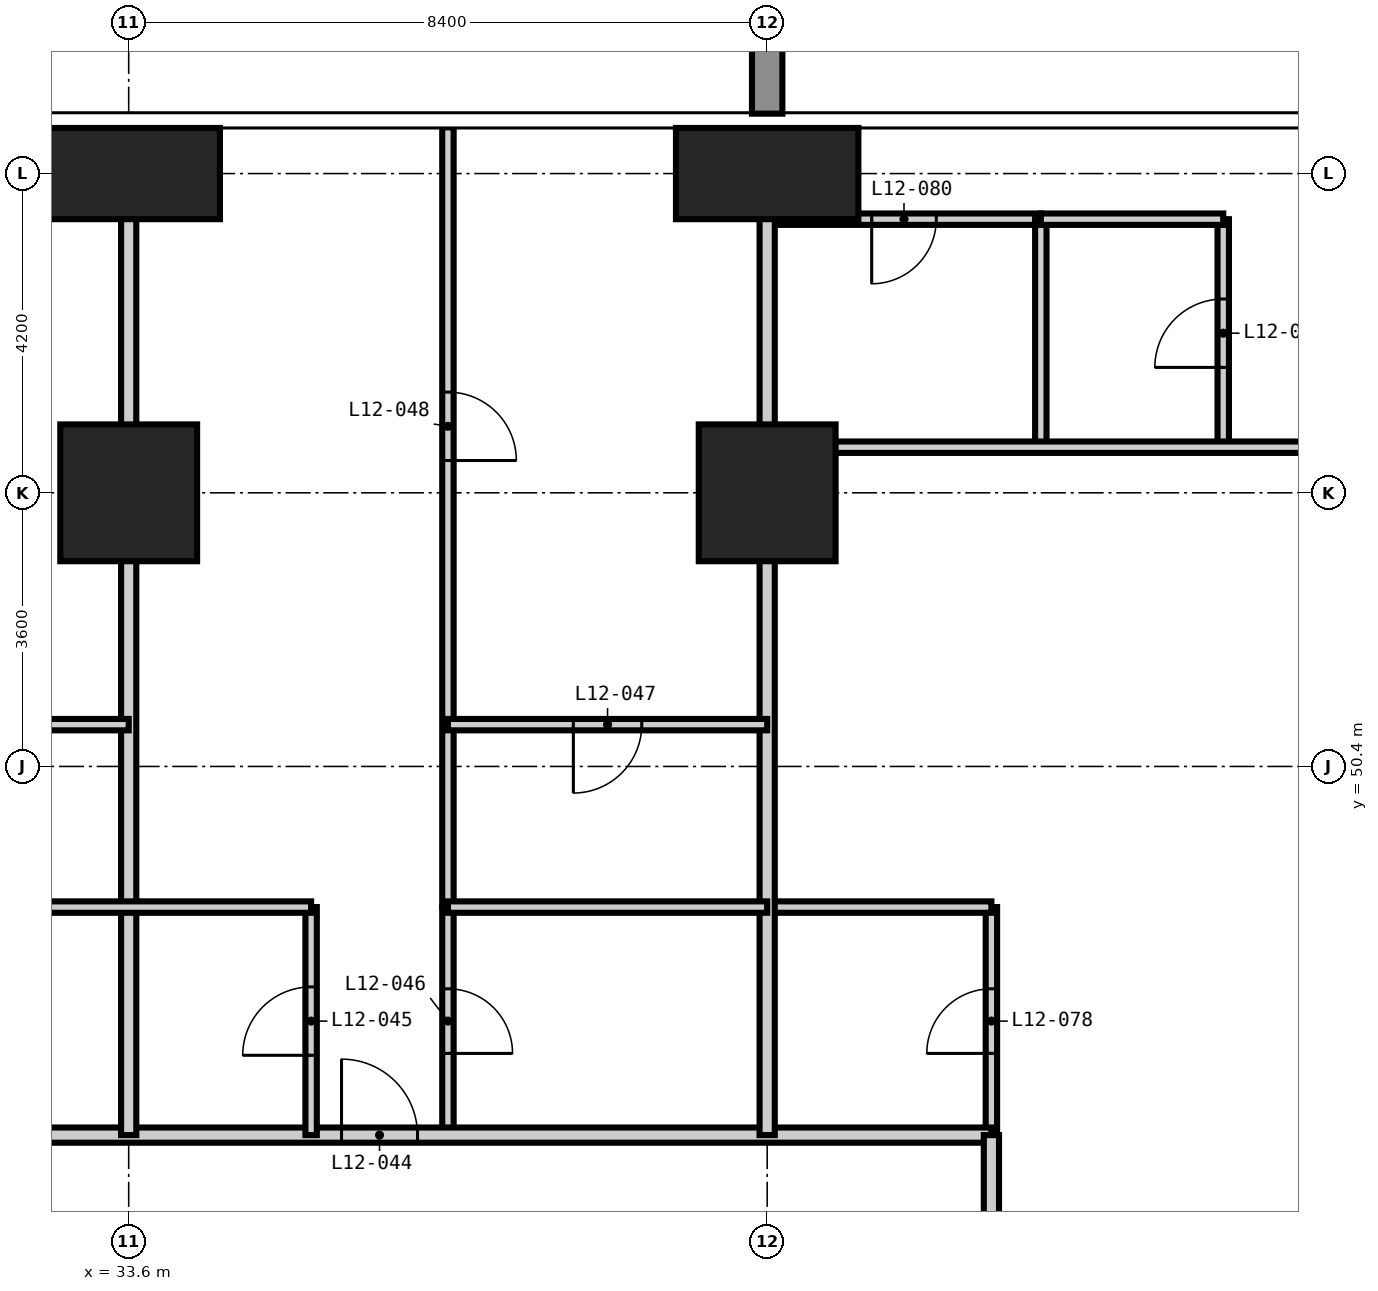
"""IFC4 building model, lengths in metres.
Left out: names, types, materials, properties, quantities, classifications, styles, units other than length and angle.
Written with IfcOpenShell. Run it as: python <this file> out.ifc"""

import sys

from ifc_helpers import new_model, si_unit, direction, frame, frame_2d, origin, origin_2d, place, context, subcontext, project, spatial, rectangle, extrude, element, fill, save


model = new_model("IFC4")
c1 = context("Model", 3, precision=1e-05, world=origin(), true_north=direction((0.0, 1.0)))
c2 = subcontext(c1, "Body", "Model", "MODEL_VIEW")
j1 = project(units=[si_unit("LENGTHUNIT", "METRE"), si_unit("PLANEANGLEUNIT", "RADIAN")], contexts=[c1])
p1 = place(None, origin())
s1 = spatial("IfcSite", under=j1, at=p1, CompositionType="ELEMENT")
p2 = place(p1, origin())
s2 = spatial("IfcBuilding", under=s1, at=p2, CompositionType="ELEMENT")
p3 = place(p2, frame((0.0, 0.0, 52.2)))
s3 = spatial("IfcBuildingStorey", under=s2, at=p3, CompositionType="ELEMENT", Elevation=52.2)
p4 = place(p3, frame((33.6, 54.0, -0.35), z_axis=(0.0, 0.0, 1.0), x_axis=(1.0, 0.0, 0.0)))
e1 = element("IfcColumn", 1, at=p4, inside=s3, PredefinedType="COLUMN", context=c2, shape_type="SweptSolid", body=[
    extrude(rectangle(XDim=1.8, YDim=1.8, at=origin_2d()), origin(), (0.0, 0.0, 1.0), 3.6),
])
p5 = place(p3, frame((33.6, 58.2, -0.35), z_axis=(0.0, 0.0, 1.0), x_axis=(1.0, 0.0, 0.0)))
e2 = element("IfcColumn", 2, at=p5, inside=s3, PredefinedType="COLUMN", context=c2, shape_type="SweptSolid", body=[
    extrude(rectangle(XDim=2.4, YDim=1.2, at=origin_2d()), origin(), (0.0, 0.0, 1.0), 3.6),
])
p6 = place(p3, frame((42.0, 54.0, -0.35), z_axis=(0.0, 0.0, 1.0), x_axis=(1.0, 0.0, 0.0)))
e3 = element("IfcColumn", 3, at=p6, inside=s3, PredefinedType="COLUMN", context=c2, shape_type="SweptSolid", body=[
    extrude(rectangle(XDim=1.8, YDim=1.8, at=origin_2d()), origin(), (0.0, 0.0, 1.0), 3.6),
])
p7 = place(p3, frame((42.0, 58.2, -0.35), z_axis=(0.0, 0.0, 1.0), x_axis=(1.0, 0.0, 0.0)))
e4 = element("IfcColumn", 4, at=p7, inside=s3, PredefinedType="COLUMN", context=c2, shape_type="SweptSolid", body=[
    extrude(rectangle(XDim=2.4, YDim=1.2, at=origin_2d()), origin(), (0.0, 0.0, 1.0), 3.6),
])
p8 = place(p3, frame((37.8, 45.55, 0.0), z_axis=(0.0, 0.0, 1.0), x_axis=(0.0, 1.0, 0.0)))
e5 = element("IfcWall", 5, at=p8, inside=s3, PredefinedType="PARTITIONING", context=c2, shape_type="SweptSolid", body=[
    extrude(rectangle(XDim=3.0, YDim=0.15, at=frame_2d((1.5, 0.0))), origin(), (0.0, 0.0, 1.0), 3.25),
])
p9 = place(p8, frame((1.075, 0.0, 0.0)))
e6 = element("IfcOpeningElement", 6, at=p9, cuts=e5, PredefinedType="OPENING", context=c2, shape_type="SweptSolid", body=[
    extrude(rectangle(XDim=0.85, YDim=2.1, at=frame_2d((0.425, 1.05))), frame((0.0, 0.085, 0.0), z_axis=(0.0, -1.0, 0.0), x_axis=(1.0, 0.0, 0.0)), (0.0, 0.0, 1.0), 0.17),
])
p10 = place(p3, frame((44.95, 45.55, 0.0), z_axis=(0.0, 0.0, 1.0), x_axis=(0.0, 1.0, 0.0)))
e7 = element("IfcWall", 7, at=p10, inside=s3, PredefinedType="PARTITIONING", context=c2, shape_type="SweptSolid", body=[
    extrude(rectangle(XDim=3.0, YDim=0.15, at=frame_2d((1.5, 0.0))), origin(), (0.0, 0.0, 1.0), 3.25),
])
p11 = place(p10, frame((1.075, 0.0, 0.0)))
e8 = element("IfcOpeningElement", 8, at=p11, cuts=e7, PredefinedType="OPENING", context=c2, shape_type="SweptSolid", body=[
    extrude(rectangle(XDim=0.85, YDim=2.1, at=frame_2d((0.425, 1.05))), frame((0.0, 0.085, 0.0), z_axis=(0.0, -1.0, 0.0), x_axis=(1.0, 0.0, 0.0)), (0.0, 0.0, 1.0), 0.17),
])
p12 = place(p3, frame((42.0, 48.55, 0.0), z_axis=(0.0, 0.0, 1.0), x_axis=(1.0, 0.0, 0.0)))
e9 = element("IfcWall", 9, at=p12, inside=s3, PredefinedType="PARTITIONING", context=c2, shape_type="SweptSolid", body=[
    extrude(rectangle(XDim=2.95, YDim=0.15, at=frame_2d((1.475, 0.0))), origin(), (0.0, 0.0, 1.0), 3.25),
])
p13 = place(p3, frame((42.0, 57.6, 0.0), z_axis=(0.0, 0.0, 1.0), x_axis=(1.0, 0.0, 0.0)))
e10 = element("IfcWall", 10, at=p13, inside=s3, PredefinedType="PARTITIONING", context=c2, shape_type="SweptSolid", body=[
    extrude(rectangle(XDim=3.6, YDim=0.15, at=frame_2d((1.8, 0.0))), origin(), (0.0, 0.0, 1.0), 3.25),
])
p14 = place(p13, frame((1.375, 0.0, 0.0)))
e11 = element("IfcOpeningElement", 11, at=p14, cuts=e10, PredefinedType="OPENING", context=c2, shape_type="SweptSolid", body=[
    extrude(rectangle(XDim=0.85, YDim=2.1, at=frame_2d((0.425, 1.05))), frame((0.0, 0.085, 0.0), z_axis=(0.0, -1.0, 0.0), x_axis=(1.0, 0.0, 0.0)), (0.0, 0.0, 1.0), 0.17),
])
p15 = place(p3, frame((12.65, 45.55, 0.0), z_axis=(0.0, 0.0, 1.0), x_axis=(1.0, 0.0, 0.0)))
e12 = element("IfcWall", 12, at=p15, inside=s3, PredefinedType="PARTITIONING", context=c2, shape_type="SweptSolid", body=[
    extrude(rectangle(XDim=32.3, YDim=0.2, at=frame_2d((16.15, 0.0))), origin(), (0.0, 0.0, 1.0), 3.25),
])
p16 = place(p15, frame((6.95, 0.0, 0.0)))
e13 = element("IfcOpeningElement", 13, at=p16, cuts=e12, PredefinedType="OPENING", context=c2, shape_type="SweptSolid", body=[
    extrude(rectangle(XDim=1.0, YDim=2.2, at=frame_2d((0.5, 1.1))), frame((0.0, 0.11, 0.0), z_axis=(0.0, -1.0, 0.0), x_axis=(1.0, 0.0, 0.0)), (0.0, 0.0, 1.0), 0.22),
])
p17 = place(p15, frame((15.35, 0.0, 0.0)))
e14 = element("IfcOpeningElement", 14, at=p17, cuts=e12, PredefinedType="OPENING", context=c2, shape_type="SweptSolid", body=[
    extrude(rectangle(XDim=1.0, YDim=2.2, at=frame_2d((0.5, 1.1))), frame((0.0, 0.11, 0.0), z_axis=(0.0, -1.0, 0.0), x_axis=(1.0, 0.0, 0.0)), (0.0, 0.0, 1.0), 0.22),
])
p18 = place(p15, frame((23.75, 0.0, 0.0)))
e15 = element("IfcOpeningElement", 15, at=p18, cuts=e12, PredefinedType="OPENING", context=c2, shape_type="SweptSolid", body=[
    extrude(rectangle(XDim=1.0, YDim=2.2, at=frame_2d((0.5, 1.1))), frame((0.0, 0.11, 0.0), z_axis=(0.0, -1.0, 0.0), x_axis=(1.0, 0.0, 0.0)), (0.0, 0.0, 1.0), 0.22),
])
p19 = place(p3, frame((44.95, 45.55, 0.0), z_axis=(0.0, 0.0, 1.0), x_axis=(0.0, -1.0, 0.0)))
e16 = element("IfcWall", 16, at=p19, inside=s3, PredefinedType="PARTITIONING", context=c2, shape_type="SweptSolid", body=[
    extrude(rectangle(XDim=32.9, YDim=0.2, at=frame_2d((16.45, 0.0))), origin(), (0.0, 0.0, 1.0), 3.25),
])
p20 = place(p19, frame((24.8, 0.0, 0.0)))
e17 = element("IfcOpeningElement", 17, at=p20, cuts=e16, PredefinedType="OPENING", context=c2, shape_type="SweptSolid", body=[
    extrude(rectangle(XDim=1.0, YDim=2.2, at=frame_2d((0.5, 1.1))), frame((0.0, 0.11, 0.0), z_axis=(0.0, -1.0, 0.0), x_axis=(1.0, 0.0, 0.0)), (0.0, 0.0, 1.0), 0.22),
])
p21 = place(p19, frame((19.85, 0.0, 0.0)))
e18 = element("IfcOpeningElement", 18, at=p21, cuts=e16, PredefinedType="OPENING", context=c2, shape_type="SweptSolid", body=[
    extrude(rectangle(XDim=1.0, YDim=2.2, at=frame_2d((0.5, 1.1))), frame((0.0, 0.11, 0.0), z_axis=(0.0, -1.0, 0.0), x_axis=(1.0, 0.0, 0.0)), (0.0, 0.0, 1.0), 0.22),
])
p22 = place(p19, frame((11.45, 0.0, 0.0)))
e19 = element("IfcOpeningElement", 19, at=p22, cuts=e16, PredefinedType="OPENING", context=c2, shape_type="SweptSolid", body=[
    extrude(rectangle(XDim=1.0, YDim=2.2, at=frame_2d((0.5, 1.1))), frame((0.0, 0.11, 0.0), z_axis=(0.0, -1.0, 0.0), x_axis=(1.0, 0.0, 0.0)), (0.0, 0.0, 1.0), 0.22),
])
p23 = place(p19, frame((6.5, 0.0, 0.0)))
e20 = element("IfcOpeningElement", 20, at=p23, cuts=e16, PredefinedType="OPENING", context=c2, shape_type="SweptSolid", body=[
    extrude(rectangle(XDim=1.0, YDim=2.2, at=frame_2d((0.5, 1.1))), frame((0.0, 0.11, 0.0), z_axis=(0.0, -1.0, 0.0), x_axis=(1.0, 0.0, 0.0)), (0.0, 0.0, 1.0), 0.22),
])
p24 = place(p19, frame((30.325, 0.0, 0.0)))
e21 = element("IfcOpeningElement", 21, at=p24, cuts=e16, PredefinedType="OPENING", context=c2, shape_type="SweptSolid", body=[
    extrude(rectangle(XDim=1.0, YDim=2.2, at=frame_2d((0.5, 1.1))), frame((0.0, 0.11, 0.0), z_axis=(0.0, -1.0, 0.0), x_axis=(1.0, 0.0, 0.0)), (0.0, 0.0, 1.0), 0.22),
])
p25 = place(p19, frame((1.275, 0.0, 0.0)))
e22 = element("IfcOpeningElement", 22, at=p25, cuts=e16, PredefinedType="OPENING", context=c2, shape_type="SweptSolid", body=[
    extrude(rectangle(XDim=1.0, YDim=2.2, at=frame_2d((0.5, 1.1))), frame((0.0, 0.11, 0.0), z_axis=(0.0, -1.0, 0.0), x_axis=(1.0, 0.0, 0.0)), (0.0, 0.0, 1.0), 0.22),
])
for number, where, z_axis, x_axis in (
    (23, (33.6, 45.55, 0.0), (0.0, 0.0, 1.0), (0.0, 1.0, 0.0)),
    (24, (42.0, 45.55, 0.0), (0.0, 0.0, 1.0), (0.0, 1.0, 0.0)),
):
    element("IfcWall", number, at=place(p3, frame(where, z_axis=z_axis, x_axis=x_axis)), inside=s3, PredefinedType="PARTITIONING", context=c2, shape_type="SweptSolid", body=[
        extrude(rectangle(XDim=13.258, YDim=0.2, at=frame_2d((6.629, 0.0))), origin(), (0.0, 0.0, 1.0), 3.25),
    ])
p26 = place(p3, frame((36.0, 45.55, 0.0), z_axis=(0.0, 0.0, 1.0), x_axis=(0.0, 1.0, 0.0)))
e25 = element("IfcWall", 25, at=p26, inside=s3, PredefinedType="PARTITIONING", context=c2, shape_type="SweptSolid", body=[
    extrude(rectangle(XDim=3.0, YDim=0.15, at=frame_2d((1.5, 0.0))), origin(), (0.0, 0.0, 1.0), 3.25),
])
p27 = place(p26, frame((1.05, 0.0, 0.0)))
e26 = element("IfcOpeningElement", 26, at=p27, cuts=e25, PredefinedType="OPENING", context=c2, shape_type="SweptSolid", body=[
    extrude(rectangle(XDim=0.9, YDim=2.1, at=frame_2d((0.45, 1.05))), frame((0.0, 0.085, 0.0), z_axis=(0.0, -1.0, 0.0), x_axis=(1.0, 0.0, 0.0)), (0.0, 0.0, 1.0), 0.17),
])
p28 = place(p3, frame((37.8, 48.55, 0.0), z_axis=(0.0, 0.0, 1.0), x_axis=(0.0, 1.0, 0.0)))
e27 = element("IfcWall", 27, at=p28, inside=s3, PredefinedType="PARTITIONING", context=c2, shape_type="SweptSolid", body=[
    extrude(rectangle(XDim=10.258, YDim=0.15, at=frame_2d((5.129, 0.0))), origin(), (0.0, 0.0, 1.0), 3.25),
])
p29 = place(p28, frame((5.875, 0.0, 0.0)))
e28 = element("IfcOpeningElement", 28, at=p29, cuts=e27, PredefinedType="OPENING", context=c2, shape_type="SweptSolid", body=[
    extrude(rectangle(XDim=0.9, YDim=2.1, at=frame_2d((0.45, 1.05))), frame((0.0, 0.085, 0.0), z_axis=(0.0, -1.0, 0.0), x_axis=(1.0, 0.0, 0.0)), (0.0, 0.0, 1.0), 0.17),
])
p30 = place(p3, frame((45.6, 54.6, 0.0), z_axis=(0.0, 0.0, 1.0), x_axis=(0.0, 1.0, 0.0)))
e29 = element("IfcWall", 29, at=p30, inside=s3, PredefinedType="PARTITIONING", context=c2, shape_type="SweptSolid", body=[
    extrude(rectangle(XDim=3.0, YDim=0.15, at=frame_2d((1.5, 0.0))), origin(), (0.0, 0.0, 1.0), 3.25),
])
p31 = place(p3, frame((48.0, 54.6, 0.0), z_axis=(0.0, 0.0, 1.0), x_axis=(0.0, 1.0, 0.0)))
e30 = element("IfcWall", 30, at=p31, inside=s3, PredefinedType="PARTITIONING", context=c2, shape_type="SweptSolid", body=[
    extrude(rectangle(XDim=3.0, YDim=0.15, at=frame_2d((1.5, 0.0))), origin(), (0.0, 0.0, 1.0), 3.25),
])
p32 = place(p31, frame((1.05, 0.0, 0.0)))
e31 = element("IfcOpeningElement", 31, at=p32, cuts=e30, PredefinedType="OPENING", context=c2, shape_type="SweptSolid", body=[
    extrude(rectangle(XDim=0.9, YDim=2.1, at=frame_2d((0.45, 1.05))), frame((0.0, 0.085, 0.0), z_axis=(0.0, -1.0, 0.0), x_axis=(1.0, 0.0, 0.0)), (0.0, 0.0, 1.0), 0.17),
])
p33 = place(p3, frame((29.4, 48.55, 0.0), z_axis=(0.0, 0.0, 1.0), x_axis=(1.0, 0.0, 0.0)))
e32 = element("IfcWall", 32, at=p33, inside=s3, PredefinedType="PARTITIONING", context=c2, shape_type="SweptSolid", body=[
    extrude(rectangle(XDim=6.6, YDim=0.15, at=frame_2d((3.3, 0.0))), origin(), (0.0, 0.0, 1.0), 3.25),
])
p34 = place(p3, frame((37.8, 48.55, 0.0), z_axis=(0.0, 0.0, 1.0), x_axis=(1.0, 0.0, 0.0)))
e33 = element("IfcWall", 33, at=p34, inside=s3, PredefinedType="PARTITIONING", context=c2, shape_type="SweptSolid", body=[
    extrude(rectangle(XDim=4.2, YDim=0.15, at=frame_2d((2.1, 0.0))), origin(), (0.0, 0.0, 1.0), 3.25),
])
p35 = place(p3, frame((29.4, 50.95, 0.0), z_axis=(0.0, 0.0, 1.0), x_axis=(1.0, 0.0, 0.0)))
e34 = element("IfcWall", 34, at=p35, inside=s3, PredefinedType="PARTITIONING", context=c2, shape_type="SweptSolid", body=[
    extrude(rectangle(XDim=4.2, YDim=0.15, at=frame_2d((2.1, 0.0))), origin(), (0.0, 0.0, 1.0), 3.25),
])
p36 = place(p35, frame((1.65, 0.0, 0.0)))
e35 = element("IfcOpeningElement", 35, at=p36, cuts=e34, PredefinedType="OPENING", context=c2, shape_type="SweptSolid", body=[
    extrude(rectangle(XDim=0.9, YDim=2.1, at=frame_2d((0.45, 1.05))), frame((0.0, 0.085, 0.0), z_axis=(0.0, -1.0, 0.0), x_axis=(1.0, 0.0, 0.0)), (0.0, 0.0, 1.0), 0.17),
])
p37 = place(p3, frame((37.8, 50.95, 0.0), z_axis=(0.0, 0.0, 1.0), x_axis=(1.0, 0.0, 0.0)))
e36 = element("IfcWall", 36, at=p37, inside=s3, PredefinedType="PARTITIONING", context=c2, shape_type="SweptSolid", body=[
    extrude(rectangle(XDim=4.2, YDim=0.15, at=frame_2d((2.1, 0.0))), origin(), (0.0, 0.0, 1.0), 3.25),
])
p38 = place(p37, frame((1.65, 0.0, 0.0)))
e37 = element("IfcOpeningElement", 37, at=p38, cuts=e36, PredefinedType="OPENING", context=c2, shape_type="SweptSolid", body=[
    extrude(rectangle(XDim=0.9, YDim=2.1, at=frame_2d((0.45, 1.05))), frame((0.0, 0.085, 0.0), z_axis=(0.0, -1.0, 0.0), x_axis=(1.0, 0.0, 0.0)), (0.0, 0.0, 1.0), 0.17),
])
p39 = place(p3, frame((42.0, 54.6, 0.0), z_axis=(0.0, 0.0, 1.0), x_axis=(1.0, 0.0, 0.0)))
e38 = element("IfcWall", 38, at=p39, inside=s3, PredefinedType="PARTITIONING", context=c2, shape_type="SweptSolid", body=[
    extrude(rectangle(XDim=16.808, YDim=0.15, at=frame_2d((8.404, 0.0))), origin(), (0.0, 0.0, 1.0), 3.25),
])
p40 = place(p39, frame((10.95, 0.0, 0.0)))
e39 = element("IfcOpeningElement", 39, at=p40, cuts=e38, PredefinedType="OPENING", context=c2, shape_type="SweptSolid", body=[
    extrude(rectangle(XDim=0.9, YDim=2.1, at=frame_2d((0.45, 1.05))), frame((0.0, 0.085, 0.0), z_axis=(0.0, -1.0, 0.0), x_axis=(1.0, 0.0, 0.0)), (0.0, 0.0, 1.0), 0.17),
])
p41 = place(p3, frame((45.6, 57.6, 0.0), z_axis=(0.0, 0.0, 1.0), x_axis=(1.0, 0.0, 0.0)))
e40 = element("IfcWall", 40, at=p41, inside=s3, PredefinedType="PARTITIONING", context=c2, shape_type="SweptSolid", body=[
    extrude(rectangle(XDim=2.4, YDim=0.15, at=frame_2d((1.2, 0.0))), origin(), (0.0, 0.0, 1.0), 3.25),
])
p42 = place(p18, origin())
e41 = element("IfcDoor", 41, at=p42, inside=s3, OperationType="SINGLE_SWING_LEFT", PredefinedType="DOOR", context=c2, shape_type="SweptSolid", body=[
    extrude(rectangle(XDim=1.0, YDim=2.2, at=frame_2d((0.5, 1.1))), frame((0.0, 0.025, 0.0), z_axis=(0.0, -1.0, 0.0), x_axis=(1.0, 0.0, 0.0)), (0.0, 0.0, 1.0), 0.05),
])
fill(e15, e41)
p43 = place(p27, origin())
e42 = element("IfcDoor", 42, at=p43, inside=s3, OperationType="SINGLE_SWING_LEFT", PredefinedType="DOOR", context=c2, shape_type="SweptSolid", body=[
    extrude(rectangle(XDim=0.9, YDim=2.1, at=frame_2d((0.45, 1.05))), frame((0.0, 0.025, 0.0), z_axis=(0.0, -1.0, 0.0), x_axis=(1.0, 0.0, 0.0)), (0.0, 0.0, 1.0), 0.05),
])
fill(e26, e42)
p44 = place(p9, frame((0.85, 0.0, 0.0), z_axis=(0.0, 0.0, 1.0), x_axis=(-1.0, 0.0, 0.0)))
e43 = element("IfcDoor", 43, at=p44, inside=s3, OperationType="SINGLE_SWING_RIGHT", PredefinedType="DOOR", context=c2, shape_type="SweptSolid", body=[
    extrude(rectangle(XDim=0.85, YDim=2.1, at=frame_2d((0.425, 1.05))), frame((0.0, 0.025, 0.0), z_axis=(0.0, -1.0, 0.0), x_axis=(1.0, 0.0, 0.0)), (0.0, 0.0, 1.0), 0.05),
])
fill(e6, e43)
p45 = place(p38, frame((0.9, 0.0, 0.0), z_axis=(0.0, 0.0, 1.0), x_axis=(-1.0, 0.0, 0.0)))
e44 = element("IfcDoor", 44, at=p45, inside=s3, OperationType="SINGLE_SWING_RIGHT", PredefinedType="DOOR", context=c2, shape_type="SweptSolid", body=[
    extrude(rectangle(XDim=0.9, YDim=2.1, at=frame_2d((0.45, 1.05))), frame((0.0, 0.025, 0.0), z_axis=(0.0, -1.0, 0.0), x_axis=(1.0, 0.0, 0.0)), (0.0, 0.0, 1.0), 0.05),
])
fill(e37, e44)
p46 = place(p29, frame((0.9, 0.0, 0.0), z_axis=(0.0, 0.0, 1.0), x_axis=(-1.0, 0.0, 0.0)))
e45 = element("IfcDoor", 45, at=p46, inside=s3, OperationType="SINGLE_SWING_RIGHT", PredefinedType="DOOR", context=c2, shape_type="SweptSolid", body=[
    extrude(rectangle(XDim=0.9, YDim=2.1, at=frame_2d((0.45, 1.05))), frame((0.0, 0.025, 0.0), z_axis=(0.0, -1.0, 0.0), x_axis=(1.0, 0.0, 0.0)), (0.0, 0.0, 1.0), 0.05),
])
fill(e28, e45)
p47 = place(p11, origin())
e46 = element("IfcDoor", 46, at=p47, inside=s3, OperationType="SINGLE_SWING_LEFT", PredefinedType="DOOR", context=c2, shape_type="SweptSolid", body=[
    extrude(rectangle(XDim=0.85, YDim=2.1, at=frame_2d((0.425, 1.05))), frame((0.0, 0.025, 0.0), z_axis=(0.0, -1.0, 0.0), x_axis=(1.0, 0.0, 0.0)), (0.0, 0.0, 1.0), 0.05),
])
fill(e8, e46)
p48 = place(p14, frame((0.85, 0.0, 0.0), z_axis=(0.0, 0.0, 1.0), x_axis=(-1.0, 0.0, 0.0)))
e47 = element("IfcDoor", 47, at=p48, inside=s3, OperationType="SINGLE_SWING_RIGHT", PredefinedType="DOOR", context=c2, shape_type="SweptSolid", body=[
    extrude(rectangle(XDim=0.85, YDim=2.1, at=frame_2d((0.425, 1.05))), frame((0.0, 0.025, 0.0), z_axis=(0.0, -1.0, 0.0), x_axis=(1.0, 0.0, 0.0)), (0.0, 0.0, 1.0), 0.05),
])
fill(e11, e47)
p49 = place(p32, origin())
e48 = element("IfcDoor", 48, at=p49, inside=s3, OperationType="SINGLE_SWING_LEFT", PredefinedType="DOOR", context=c2, shape_type="SweptSolid", body=[
    extrude(rectangle(XDim=0.9, YDim=2.1, at=frame_2d((0.45, 1.05))), frame((0.0, 0.025, 0.0), z_axis=(0.0, -1.0, 0.0), x_axis=(1.0, 0.0, 0.0)), (0.0, 0.0, 1.0), 0.05),
])
fill(e31, e48)
save(model, sys.argv[1])
